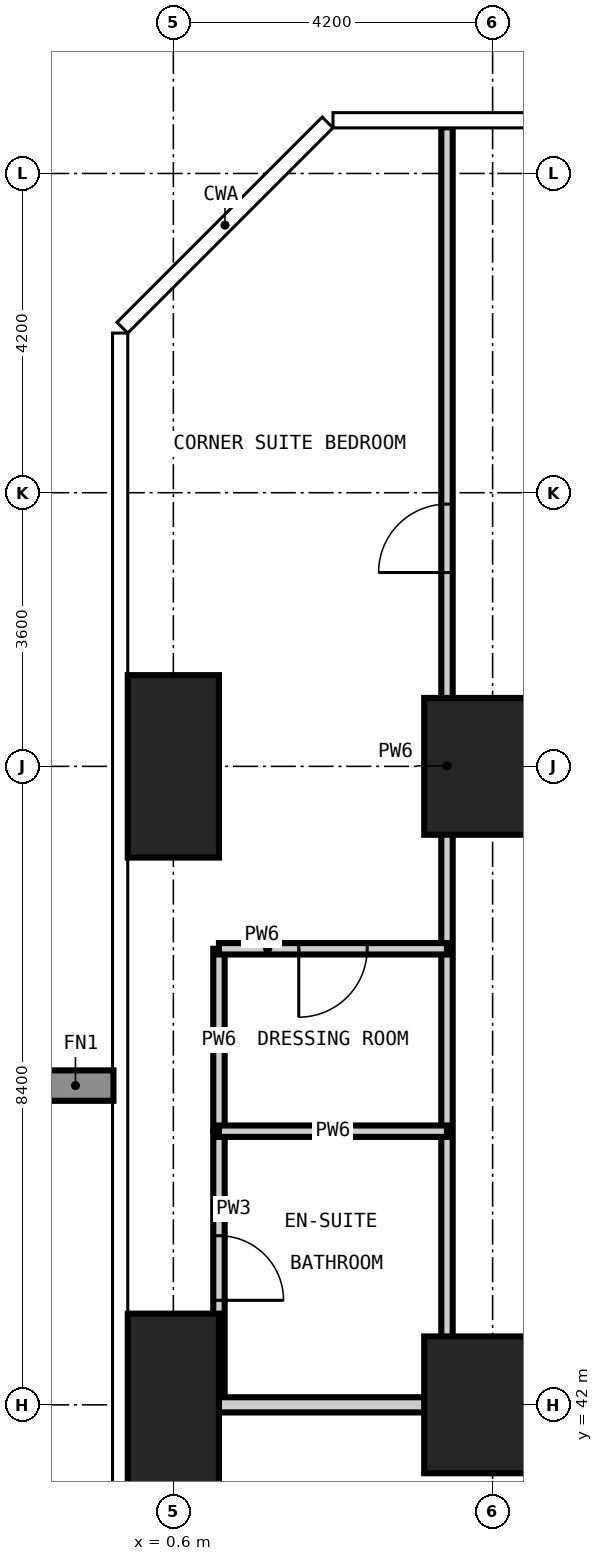
"""IFC4 building model, lengths in metres.
Left out: names, types, materials, properties, quantities, classifications, styles, units other than length and angle.
Written with IfcOpenShell. Run it as: python <this file> out.ifc"""

import sys

from ifc_helpers import new_model, si_unit, direction, frame, frame_2d, origin, origin_2d, place, context, subcontext, project, spatial, rectangle, extrude, element, fill, save


model = new_model("IFC4")
c1 = context("Model", 3, precision=1e-05, world=origin(), true_north=direction((0.0, 1.0)))
c2 = subcontext(c1, "Body", "Model", "MODEL_VIEW")
j1 = project(units=[si_unit("LENGTHUNIT", "METRE"), si_unit("PLANEANGLEUNIT", "RADIAN")], contexts=[c1])
p1 = place(None, origin())
s1 = spatial("IfcSite", under=j1, at=p1, CompositionType="ELEMENT")
p2 = place(p1, origin())
s2 = spatial("IfcBuilding", under=s1, at=p2, CompositionType="ELEMENT")
p3 = place(p2, frame((0.0, 0.0, 34.2)))
s3 = spatial("IfcBuildingStorey", under=s2, at=p3, CompositionType="ELEMENT", Elevation=34.2)
for number, where, z_axis, x_axis in (
    (1, (0.6, 42.0, -0.35), (0.0, 0.0, 1.0), (1.0, 0.0, 0.0)),
    (2, (0.6, 50.4, -0.35), (0.0, 0.0, 1.0), (1.0, 0.0, 0.0)),
):
    element("IfcColumn", number, at=place(p3, frame(where, z_axis=z_axis, x_axis=x_axis)), inside=s3, PredefinedType="COLUMN", context=c2, shape_type="SweptSolid", body=[
        extrude(rectangle(XDim=1.2, YDim=2.4, at=origin_2d()), origin(), (0.0, 0.0, 1.0), 3.6),
    ])
for number, where, z_axis, x_axis in (
    (3, (4.8, 42.0, -0.35), (0.0, 0.0, 1.0), (1.0, 0.0, 0.0)),
    (4, (4.8, 50.4, -0.35), (0.0, 0.0, 1.0), (1.0, 0.0, 0.0)),
):
    element("IfcColumn", number, at=place(p3, frame(where, z_axis=z_axis, x_axis=x_axis)), inside=s3, PredefinedType="COLUMN", context=c2, shape_type="SweptSolid", body=[
        extrude(rectangle(XDim=1.8, YDim=1.8, at=origin_2d()), origin(), (0.0, 0.0, 1.0), 3.6),
    ])
p4 = place(p3, frame((1.2, 42.0, 0.0), z_axis=(0.0, 0.0, 1.0), x_axis=(0.0, 1.0, 0.0)))
e5 = element("IfcWall", 5, at=p4, inside=s3, PredefinedType="PARTITIONING", context=c2, shape_type="SweptSolid", body=[
    extrude(rectangle(XDim=3.6, YDim=0.15, at=frame_2d((1.8, 0.0))), origin(), (0.0, 0.0, 1.0), 3.25),
])
p5 = place(p4, frame((1.375, 0.0, 0.0)))
e6 = element("IfcOpeningElement", 6, at=p5, cuts=e5, PredefinedType="OPENING", context=c2, shape_type="SweptSolid", body=[
    extrude(rectangle(XDim=0.85, YDim=2.1, at=frame_2d((0.425, 1.05))), frame((0.0, 0.085, 0.0), z_axis=(0.0, -1.0, 0.0), x_axis=(1.0, 0.0, 0.0)), (0.0, 0.0, 1.0), 0.17),
])
p6 = place(p3, frame((-0.008, 42.0, 0.0), z_axis=(0.0, 0.0, 1.0), x_axis=(1.0, 0.0, 0.0)))
e7 = element("IfcWall", 7, at=p6, inside=s3, PredefinedType="PARTITIONING", context=c2, shape_type="SweptSolid", body=[
    extrude(rectangle(XDim=13.258, YDim=0.2, at=frame_2d((6.629, 0.0))), origin(), (0.0, 0.0, 1.0), 3.25),
])
p7 = place(p3, frame((1.2, 45.6, 0.0), z_axis=(0.0, 0.0, 1.0), x_axis=(0.0, 1.0, 0.0)))
e8 = element("IfcWall", 8, at=p7, inside=s3, PredefinedType="PARTITIONING", context=c2, shape_type="SweptSolid", body=[
    extrude(rectangle(XDim=2.4, YDim=0.15, at=frame_2d((1.2, 0.0))), origin(), (0.0, 0.0, 1.0), 3.25),
])
p8 = place(p3, frame((4.2, 42.0, 0.0), z_axis=(0.0, 0.0, 1.0), x_axis=(0.0, 1.0, 0.0)))
e9 = element("IfcWall", 9, at=p8, inside=s3, PredefinedType="PARTITIONING", context=c2, shape_type="SweptSolid", body=[
    extrude(rectangle(XDim=16.808, YDim=0.15, at=frame_2d((8.404, 0.0))), origin(), (0.0, 0.0, 1.0), 3.25),
])
p9 = place(p8, frame((10.95, 0.0, 0.0)))
e10 = element("IfcOpeningElement", 10, at=p9, cuts=e9, PredefinedType="OPENING", context=c2, shape_type="SweptSolid", body=[
    extrude(rectangle(XDim=0.9, YDim=2.1, at=frame_2d((0.45, 1.05))), frame((0.0, 0.085, 0.0), z_axis=(0.0, -1.0, 0.0), x_axis=(1.0, 0.0, 0.0)), (0.0, 0.0, 1.0), 0.17),
])
p10 = place(p3, frame((1.2, 45.6, 0.0), z_axis=(0.0, 0.0, 1.0), x_axis=(1.0, 0.0, 0.0)))
e11 = element("IfcWall", 11, at=p10, inside=s3, PredefinedType="PARTITIONING", context=c2, shape_type="SweptSolid", body=[
    extrude(rectangle(XDim=3.0, YDim=0.15, at=frame_2d((1.5, 0.0))), origin(), (0.0, 0.0, 1.0), 3.25),
])
p11 = place(p3, frame((1.2, 48.0, 0.0), z_axis=(0.0, 0.0, 1.0), x_axis=(1.0, 0.0, 0.0)))
e12 = element("IfcWall", 12, at=p11, inside=s3, PredefinedType="PARTITIONING", context=c2, shape_type="SweptSolid", body=[
    extrude(rectangle(XDim=3.0, YDim=0.15, at=frame_2d((1.5, 0.0))), origin(), (0.0, 0.0, 1.0), 3.25),
])
p12 = place(p11, frame((1.05, 0.0, 0.0)))
e13 = element("IfcOpeningElement", 13, at=p12, cuts=e12, PredefinedType="OPENING", context=c2, shape_type="SweptSolid", body=[
    extrude(rectangle(XDim=0.9, YDim=2.1, at=frame_2d((0.45, 1.05))), frame((0.0, 0.085, 0.0), z_axis=(0.0, -1.0, 0.0), x_axis=(1.0, 0.0, 0.0)), (0.0, 0.0, 1.0), 0.17),
])
p13 = place(p9, origin())
e14 = element("IfcDoor", 14, at=p13, inside=s3, OperationType="SINGLE_SWING_LEFT", PredefinedType="DOOR", context=c2, shape_type="SweptSolid", body=[
    extrude(rectangle(XDim=0.9, YDim=2.1, at=frame_2d((0.45, 1.05))), frame((0.0, 0.025, 0.0), z_axis=(0.0, -1.0, 0.0), x_axis=(1.0, 0.0, 0.0)), (0.0, 0.0, 1.0), 0.05),
])
fill(e10, e14)
p14 = place(p5, frame((0.85, 0.0, 0.0), z_axis=(0.0, 0.0, 1.0), x_axis=(-1.0, 0.0, 0.0)))
e15 = element("IfcDoor", 15, at=p14, inside=s3, OperationType="SINGLE_SWING_RIGHT", PredefinedType="DOOR", context=c2, shape_type="SweptSolid", body=[
    extrude(rectangle(XDim=0.85, YDim=2.1, at=frame_2d((0.425, 1.05))), frame((0.0, 0.025, 0.0), z_axis=(0.0, -1.0, 0.0), x_axis=(1.0, 0.0, 0.0)), (0.0, 0.0, 1.0), 0.05),
])
fill(e6, e15)
p15 = place(p12, frame((0.9, 0.0, 0.0), z_axis=(0.0, 0.0, 1.0), x_axis=(-1.0, 0.0, 0.0)))
e16 = element("IfcDoor", 16, at=p15, inside=s3, OperationType="SINGLE_SWING_RIGHT", PredefinedType="DOOR", context=c2, shape_type="SweptSolid", body=[
    extrude(rectangle(XDim=0.9, YDim=2.1, at=frame_2d((0.45, 1.05))), frame((0.0, 0.025, 0.0), z_axis=(0.0, -1.0, 0.0), x_axis=(1.0, 0.0, 0.0)), (0.0, 0.0, 1.0), 0.05),
])
fill(e13, e16)
save(model, sys.argv[1])
